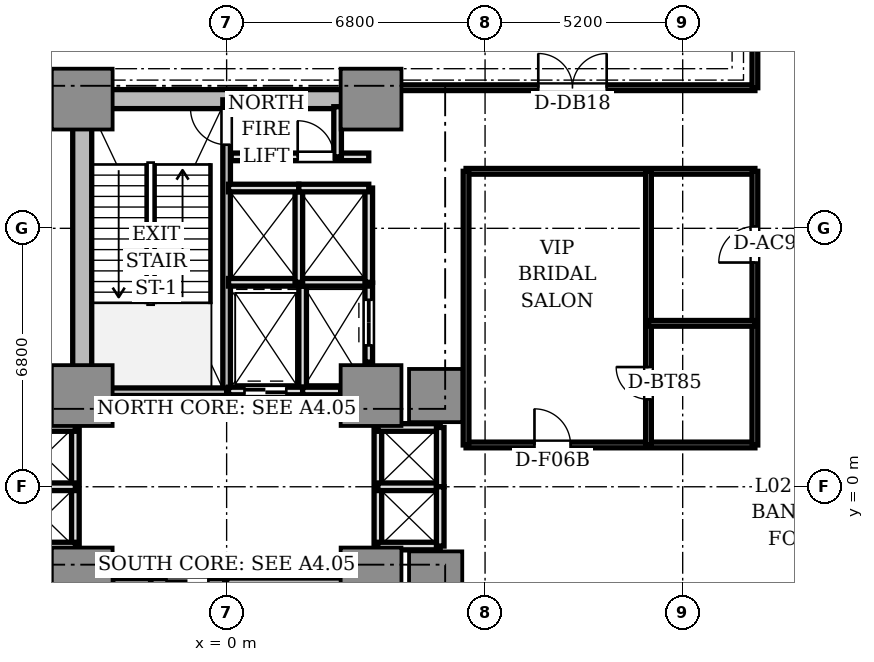
"""IFC4 building model, lengths in metres.
Left out: names, types, materials, properties, quantities, classifications, styles, units other than length and angle.
Written with IfcOpenShell. Run it as: python <this file> out.ifc"""

import sys

from ifc_helpers import new_model, si_unit, direction, frame, frame_2d, origin, origin_2d, place, context, subcontext, project, spatial, rectangle, extrude, source, transform, mapped, element, fill, save


model = new_model("IFC4")
c1 = context("Model", 3, precision=1e-05, world=origin(), true_north=direction((0.0, 1.0)))
c2 = subcontext(c1, "Body", "Model", "MODEL_VIEW")
j1 = project(units=[si_unit("LENGTHUNIT", "METRE"), si_unit("PLANEANGLEUNIT", "RADIAN")], contexts=[c1])
p1 = place(None, origin())
s1 = spatial("IfcSite", under=j1, at=p1, CompositionType="ELEMENT")
p2 = place(p1, origin())
s2 = spatial("IfcBuilding", under=s1, at=p2, CompositionType="ELEMENT")
p3 = place(p2, frame((0.0, 0.0, 9.3)))
s3 = spatial("IfcBuildingStorey", under=s2, at=p3, CompositionType="ELEMENT", Elevation=9.3)
p4 = place(p3, frame((-3.55, 10.2, 0.0), z_axis=(0.0, 0.0, 1.0), x_axis=(1.0, 0.0, 0.0)))
e1 = element("IfcWall", 1, at=p4, inside=s3, PredefinedType="SHEAR", context=c2, shape_type="SweptSolid", body=[
    extrude(rectangle(XDim=7.1, YDim=0.5, at=frame_2d((3.55, 0.0))), origin(), (0.0, 0.0, 1.0), 4.4),
])
p5 = place(p3, frame((-3.8, 2.85, 0.0), z_axis=(0.0, 0.0, 1.0), x_axis=(0.0, 1.0, 0.0)))
e2 = element("IfcWall", 2, at=p5, inside=s3, PredefinedType="SHEAR", context=c2, shape_type="SweptSolid", body=[
    extrude(rectangle(XDim=6.9, YDim=0.5, at=frame_2d((3.45, 0.0))), origin(), (0.0, 0.0, 1.0), 4.4),
])
m1 = source(origin(), c2, "Body", "SweptSolid", [
    extrude(rectangle(XDim=1.6, YDim=1.6, at=origin_2d()), origin(), (0.0, 0.0, 1.0), 4.4),
])
for number, where, z_axis, x_axis in (
    (3, (-3.8, 2.4, 0.0), (0.0, 0.0, 1.0), (1.0, 0.0, 0.0)),
    (4, (3.8, 2.4, 0.0), (0.0, 0.0, 1.0), (1.0, 0.0, 0.0)),
    (5, (-3.8, 10.2, 0.0), (0.0, 0.0, 1.0), (1.0, 0.0, 0.0)),
    (6, (3.8, 10.2, 0.0), (0.0, 0.0, 1.0), (1.0, 0.0, 0.0)),
    (7, (-3.8, -2.4, 0.0), (0.0, 0.0, 1.0), (1.0, 0.0, 0.0)),
    (8, (3.8, -2.4, 0.0), (0.0, 0.0, 1.0), (1.0, 0.0, 0.0)),
):
    element("IfcColumn", number, at=place(p3, frame(where, z_axis=z_axis, x_axis=x_axis)), inside=s3, PredefinedType="COLUMN", context=c2, shape_type="MappedRepresentation", body=[
        mapped(m1, transform((0.0, 0.0, 0.0), scale=1.0)),
    ])
m2 = source(origin(), c2, "Body", "SweptSolid", [
    extrude(rectangle(XDim=1.4, YDim=1.4, at=origin_2d()), origin(), (0.0, 0.0, 1.0), 4.4),
])
for number, where, z_axis, x_axis in (
    (9, (5.5, 2.4, 0.0), (0.0, 0.0, 1.0), (1.0, 0.0, 0.0)),
    (10, (5.5, -2.4, 0.0), (0.0, 0.0, 1.0), (1.0, 0.0, 0.0)),
):
    element("IfcColumn", number, at=place(p3, frame(where, z_axis=z_axis, x_axis=x_axis)), inside=s3, PredefinedType="COLUMN", context=c2, shape_type="MappedRepresentation", body=[
        mapped(m2, transform((0.0, 0.0, 0.0), scale=1.0)),
    ])
p6 = place(p3, frame((0.0, 2.5, 0.0), z_axis=(0.0, 0.0, 1.0), x_axis=(0.0, 1.0, 0.0)))
e11 = element("IfcWall", 11, at=p6, inside=s3, PredefinedType="SOLIDWALL", context=c2, shape_type="SweptSolid", body=[
    extrude(rectangle(XDim=7.68, YDim=0.2, at=frame_2d((3.84, 0.0))), origin(), (0.0, 0.0, 1.0), 4.4),
])
p7 = place(p6, frame((6.5, 0.0, 0.0)))
e12 = element("IfcOpeningElement", 12, at=p7, cuts=e11, PredefinedType="OPENING", context=c2, shape_type="SweptSolid", body=[
    extrude(rectangle(XDim=0.95, YDim=2.15, at=frame_2d((0.475, 1.075))), frame((0.0, 0.11, 0.0), z_axis=(0.0, -1.0, 0.0), x_axis=(1.0, 0.0, 0.0)), (0.0, 0.0, 1.0), 0.22),
])
p8 = place(p3, frame((-3.72, 2.5, 0.0), z_axis=(0.0, 0.0, 1.0), x_axis=(1.0, 0.0, 0.0)))
e13 = element("IfcWall", 13, at=p8, inside=s3, PredefinedType="SOLIDWALL", context=c2, shape_type="SweptSolid", body=[
    extrude(rectangle(XDim=3.72, YDim=0.2, at=frame_2d((1.86, 0.0))), origin(), (0.0, 0.0, 1.0), 4.4),
])
p9 = place(p3, frame((0.0, -10.18, 0.0), z_axis=(0.0, 0.0, 1.0), x_axis=(0.0, 1.0, 0.0)))
e14 = element("IfcWall", 14, at=p9, inside=s3, PredefinedType="SOLIDWALL", context=c2, shape_type="SweptSolid", body=[
    extrude(rectangle(XDim=7.68, YDim=0.2, at=frame_2d((3.84, 0.0))), origin(), (0.0, 0.0, 1.0), 4.4),
])
p10 = place(p9, frame((0.28, 0.0, 0.0)))
e15 = element("IfcOpeningElement", 15, at=p10, cuts=e14, PredefinedType="OPENING", context=c2, shape_type="SweptSolid", body=[
    extrude(rectangle(XDim=1.1, YDim=2.15, at=frame_2d((0.55, 1.075))), frame((0.0, 0.11, 0.0), z_axis=(0.0, -1.0, 0.0), x_axis=(1.0, 0.0, 0.0)), (0.0, 0.0, 1.0), 0.22),
])
p11 = place(p3, frame((0.0, -2.5, 0.0), z_axis=(0.0, 0.0, 1.0), x_axis=(1.0, 0.0, 0.0)))
e16 = element("IfcWall", 16, at=p11, inside=s3, PredefinedType="SOLIDWALL", context=c2, shape_type="SweptSolid", body=[
    extrude(rectangle(XDim=3.72, YDim=0.2, at=frame_2d((1.86, 0.0))), origin(), (0.0, 0.0, 1.0), 4.4),
])
p12 = place(p3, frame((2.0, 2.5, 0.0), z_axis=(0.0, 0.0, 1.0), x_axis=(0.0, 1.0, 0.0)))
e17 = element("IfcWall", 17, at=p12, inside=s3, PredefinedType="SOLIDWALL", context=c2, shape_type="SweptSolid", body=[
    extrude(rectangle(XDim=2.78, YDim=0.2, at=frame_2d((1.39, 0.0))), origin(), (0.0, 0.0, 1.0), 3.95),
])
p13 = place(p3, frame((0.05, 2.52, 0.0), z_axis=(0.0, 0.0, 1.0), x_axis=(1.0, 0.0, 0.0)))
e18 = element("IfcWall", 18, at=p13, inside=s3, PredefinedType="SOLIDWALL", context=c2, shape_type="SweptSolid", body=[
    extrude(rectangle(XDim=1.95, YDim=0.2, at=frame_2d((0.975, 0.0))), origin(), (0.0, 0.0, 1.0), 3.95),
])
p14 = place(p13, frame((0.42, 0.0, 0.0)))
e19 = element("IfcOpeningElement", 19, at=p14, cuts=e18, PredefinedType="OPENING", context=c2, shape_type="SweptSolid", body=[
    extrude(rectangle(XDim=1.1, YDim=2.2, at=frame_2d((0.55, 1.1))), frame((0.0, 0.11, 0.0), z_axis=(0.0, -1.0, 0.0), x_axis=(1.0, 0.0, 0.0)), (0.0, 0.0, 1.0), 0.22),
])
p15 = place(p3, frame((-2.0, -5.28, 0.0), z_axis=(0.0, 0.0, 1.0), x_axis=(0.0, 1.0, 0.0)))
e20 = element("IfcWall", 20, at=p15, inside=s3, PredefinedType="SOLIDWALL", context=c2, shape_type="SweptSolid", body=[
    extrude(rectangle(XDim=2.78, YDim=0.2, at=frame_2d((1.39, 0.0))), origin(), (0.0, 0.0, 1.0), 3.95),
])
p16 = place(p3, frame((-2.0, -2.52, 0.0), z_axis=(0.0, 0.0, 1.0), x_axis=(1.0, 0.0, 0.0)))
e21 = element("IfcWall", 21, at=p16, inside=s3, PredefinedType="SOLIDWALL", context=c2, shape_type="SweptSolid", body=[
    extrude(rectangle(XDim=1.95, YDim=0.2, at=frame_2d((0.975, 0.0))), origin(), (0.0, 0.0, 1.0), 3.95),
])
p17 = place(p16, frame((0.42, 0.0, 0.0)))
e22 = element("IfcOpeningElement", 22, at=p17, cuts=e21, PredefinedType="OPENING", context=c2, shape_type="SweptSolid", body=[
    extrude(rectangle(XDim=1.1, YDim=2.2, at=frame_2d((0.55, 1.1))), frame((0.0, 0.11, 0.0), z_axis=(0.0, -1.0, 0.0), x_axis=(1.0, 0.0, 0.0)), (0.0, 0.0, 1.0), 0.22),
])
p18 = place(p3, frame((2.0, 2.52, 0.0), z_axis=(0.0, 0.0, 1.0), x_axis=(1.0, 0.0, 0.0)))
e23 = element("IfcWall", 23, at=p18, inside=s3, PredefinedType="SOLIDWALL", context=c2, shape_type="SweptSolid", body=[
    extrude(rectangle(XDim=1.0, YDim=0.2, at=frame_2d((0.5, 0.0))), origin(), (0.0, 0.0, 1.0), 3.95),
])
p19 = place(p3, frame((3.74, 3.28, 0.0), z_axis=(0.0, 0.0, 1.0), x_axis=(0.0, 1.0, 0.0)))
e24 = element("IfcWall", 24, at=p19, inside=s3, PredefinedType="SOLIDWALL", context=c2, shape_type="SweptSolid", body=[
    extrude(rectangle(XDim=2.08, YDim=0.2, at=frame_2d((1.04, 0.0))), origin(), (0.0, 0.0, 1.0), 3.95),
])
p20 = place(p19, frame((0.44, 0.0, 0.0)))
e25 = element("IfcOpeningElement", 25, at=p20, cuts=e24, PredefinedType="OPENING", context=c2, shape_type="SweptSolid", body=[
    extrude(rectangle(XDim=1.2, YDim=2.2, at=frame_2d((0.6, 1.1))), frame((0.0, 0.11, 0.0), z_axis=(0.0, -1.0, 0.0), x_axis=(1.0, 0.0, 0.0)), (0.0, 0.0, 1.0), 0.22),
])
p21 = place(p3, frame((-3.0, -2.52, 0.0), z_axis=(0.0, 0.0, 1.0), x_axis=(1.0, 0.0, 0.0)))
e26 = element("IfcWall", 26, at=p21, inside=s3, PredefinedType="SOLIDWALL", context=c2, shape_type="SweptSolid", body=[
    extrude(rectangle(XDim=1.0, YDim=0.2, at=frame_2d((0.5, 0.0))), origin(), (0.0, 0.0, 1.0), 3.95),
])
p22 = place(p3, frame((0.05, 5.38, 0.0), z_axis=(0.0, 0.0, 1.0), x_axis=(1.0, 0.0, 0.0)))
e27 = element("IfcWall", 27, at=p22, inside=s3, PredefinedType="SOLIDWALL", context=c2, shape_type="SweptSolid", body=[
    extrude(rectangle(XDim=3.69, YDim=0.2, at=frame_2d((1.845, 0.0))), origin(), (0.0, 0.0, 1.0), 3.95),
])
p23 = place(p3, frame((1.9, 5.38, 0.0), z_axis=(0.0, 0.0, 1.0), x_axis=(0.0, 1.0, 0.0)))
e28 = element("IfcWall", 28, at=p23, inside=s3, PredefinedType="SOLIDWALL", context=c2, shape_type="SweptSolid", body=[
    extrude(rectangle(XDim=2.48, YDim=0.2, at=frame_2d((1.24, 0.0))), origin(), (0.0, 0.0, 1.0), 3.95),
])
p24 = place(p3, frame((0.05, 7.86, 0.0), z_axis=(0.0, 0.0, 1.0), x_axis=(1.0, 0.0, 0.0)))
e29 = element("IfcWall", 29, at=p24, inside=s3, PredefinedType="SOLIDWALL", context=c2, shape_type="SweptSolid", body=[
    extrude(rectangle(XDim=1.85, YDim=0.2, at=frame_2d((0.925, 0.0))), origin(), (0.0, 0.0, 1.0), 3.95),
])
p25 = place(p3, frame((3.74, 5.38, 0.0), z_axis=(0.0, 0.0, 1.0), x_axis=(0.0, 1.0, 0.0)))
e30 = element("IfcWall", 30, at=p25, inside=s3, PredefinedType="SOLIDWALL", context=c2, shape_type="SweptSolid", body=[
    extrude(rectangle(XDim=2.48, YDim=0.2, at=frame_2d((1.24, 0.0))), origin(), (0.0, 0.0, 1.0), 3.95),
])
p26 = place(p3, frame((1.9, 7.86, 0.0), z_axis=(0.0, 0.0, 1.0), x_axis=(1.0, 0.0, 0.0)))
e31 = element("IfcWall", 31, at=p26, inside=s3, PredefinedType="SOLIDWALL", context=c2, shape_type="SweptSolid", body=[
    extrude(rectangle(XDim=1.84, YDim=0.2, at=frame_2d((0.92, 0.0))), origin(), (0.0, 0.0, 1.0), 3.95),
])
p27 = place(p3, frame((3.98, -1.56, 0.0), z_axis=(0.0, 0.0, 1.0), x_axis=(0.0, 1.0, 0.0)))
e32 = element("IfcWall", 32, at=p27, inside=s3, PredefinedType="SOLIDWALL", context=c2, shape_type="SweptSolid", body=[
    extrude(rectangle(XDim=3.12, YDim=0.2, at=frame_2d((1.56, 0.0))), origin(), (0.0, 0.0, 1.0), 3.47),
])
for number, where, z_axis, x_axis in (
    (33, (3.98, 1.56, 0.0), (0.0, 0.0, 1.0), (1.0, 0.0, 0.0)),
    (34, (3.98, -1.56, 0.0), (0.0, 0.0, 1.0), (1.0, 0.0, 0.0)),
    (35, (3.98, 0.0, 0.0), (0.0, 0.0, 1.0), (1.0, 0.0, 0.0)),
):
    element("IfcWall", number, at=place(p3, frame(where, z_axis=z_axis, x_axis=x_axis)), inside=s3, PredefinedType="SOLIDWALL", context=c2, shape_type="SweptSolid", body=[
        extrude(rectangle(XDim=1.64, YDim=0.2, at=frame_2d((0.82, 0.0))), origin(), (0.0, 0.0, 1.0), 3.95),
    ])
for number, where, z_axis, x_axis in (
    (36, (5.62, 0.0, 0.0), (0.0, 0.0, 1.0), (0.0, 1.0, 0.0)),
    (37, (5.62, -1.56, 0.0), (0.0, 0.0, 1.0), (0.0, 1.0, 0.0)),
):
    element("IfcWall", number, at=place(p3, frame(where, z_axis=z_axis, x_axis=x_axis)), inside=s3, PredefinedType="SOLIDWALL", context=c2, shape_type="SweptSolid", body=[
        extrude(rectangle(XDim=1.56, YDim=0.2, at=frame_2d((0.78, 0.0))), origin(), (0.0, 0.0, 1.0), 3.95),
    ])
p28 = place(p3, frame((-3.98, -1.56, 0.0), z_axis=(0.0, 0.0, 1.0), x_axis=(0.0, 1.0, 0.0)))
e38 = element("IfcWall", 38, at=p28, inside=s3, PredefinedType="SOLIDWALL", context=c2, shape_type="SweptSolid", body=[
    extrude(rectangle(XDim=3.12, YDim=0.2, at=frame_2d((1.56, 0.0))), origin(), (0.0, 0.0, 1.0), 3.47),
])
for number, where, z_axis, x_axis in (
    (39, (-5.62, 1.56, 0.0), (0.0, 0.0, 1.0), (1.0, 0.0, 0.0)),
    (40, (-5.62, -1.56, 0.0), (0.0, 0.0, 1.0), (1.0, 0.0, 0.0)),
    (41, (-5.62, 0.0, 0.0), (0.0, 0.0, 1.0), (1.0, 0.0, 0.0)),
):
    element("IfcWall", number, at=place(p3, frame(where, z_axis=z_axis, x_axis=x_axis)), inside=s3, PredefinedType="SOLIDWALL", context=c2, shape_type="SweptSolid", body=[
        extrude(rectangle(XDim=1.64, YDim=0.2, at=frame_2d((0.82, 0.0))), origin(), (0.0, 0.0, 1.0), 3.95),
    ])
p29 = place(p3, frame((0.12, 8.68, 0.0), z_axis=(0.0, 0.0, 1.0), x_axis=(1.0, 0.0, 0.0)))
e42 = element("IfcWall", 42, at=p29, inside=s3, PredefinedType="SOLIDWALL", context=c2, shape_type="SweptSolid", body=[
    extrude(rectangle(XDim=3.62, YDim=0.2, at=frame_2d((1.81, 0.0))), origin(), (0.0, 0.0, 1.0), 3.95),
])
p30 = place(p29, frame((1.75, 0.0, 0.0)))
e43 = element("IfcOpeningElement", 43, at=p30, cuts=e42, PredefinedType="OPENING", context=c2, shape_type="SweptSolid", body=[
    extrude(rectangle(XDim=0.95, YDim=2.15, at=frame_2d((0.475, 1.075))), frame((0.0, 0.11, 0.0), z_axis=(0.0, -1.0, 0.0), x_axis=(1.0, 0.0, 0.0)), (0.0, 0.0, 1.0), 0.22),
])
p31 = place(p3, frame((2.92, 8.68, 0.0), z_axis=(0.0, 0.0, 1.0), x_axis=(0.0, 1.0, 0.0)))
e44 = element("IfcWall", 44, at=p31, inside=s3, PredefinedType="SOLIDWALL", context=c2, shape_type="SweptSolid", body=[
    extrude(rectangle(XDim=1.32, YDim=0.2, at=frame_2d((0.66, 0.0))), origin(), (0.0, 0.0, 1.0), 3.95),
])
p32 = place(p3, frame((-13.9, 10.5, 0.0), z_axis=(0.0, 0.0, 1.0), x_axis=(1.0, 0.0, 0.0)))
e45 = element("IfcWall", 45, at=p32, inside=s3, PredefinedType="PARTITIONING", context=c2, shape_type="SweptSolid", body=[
    extrude(rectangle(XDim=9.5, YDim=0.15, at=frame_2d((4.75, 0.0))), origin(), (0.0, 0.0, 1.0), 3.95),
])
p33 = place(p32, frame((3.8, 0.0, 0.0)))
e46 = element("IfcOpeningElement", 46, at=p33, cuts=e45, PredefinedType="OPENING", context=c2, shape_type="SweptSolid", body=[
    extrude(rectangle(XDim=1.8, YDim=2.35, at=frame_2d((0.9, 1.175))), frame((0.0, 0.085, 0.0), z_axis=(0.0, -1.0, 0.0), x_axis=(1.0, 0.0, 0.0)), (0.0, 0.0, 1.0), 0.17),
])
p34 = place(p3, frame((4.4, 10.5, 0.0), z_axis=(0.0, 0.0, 1.0), x_axis=(1.0, 0.0, 0.0)))
e47 = element("IfcWall", 47, at=p34, inside=s3, PredefinedType="PARTITIONING", context=c2, shape_type="SweptSolid", body=[
    extrude(rectangle(XDim=9.5, YDim=0.15, at=frame_2d((4.75, 0.0))), origin(), (0.0, 0.0, 1.0), 3.95),
])
p35 = place(p34, frame((3.8, 0.0, 0.0)))
e48 = element("IfcOpeningElement", 48, at=p35, cuts=e47, PredefinedType="OPENING", context=c2, shape_type="SweptSolid", body=[
    extrude(rectangle(XDim=1.8, YDim=2.35, at=frame_2d((0.9, 1.175))), frame((0.0, 0.085, 0.0), z_axis=(0.0, -1.0, 0.0), x_axis=(1.0, 0.0, 0.0)), (0.0, 0.0, 1.0), 0.17),
])
p36 = place(p3, frame((13.9, 10.5, 0.0), z_axis=(0.0, 0.0, 1.0), x_axis=(0.0, 1.0, 0.0)))
e49 = element("IfcWall", 49, at=p36, inside=s3, PredefinedType="PARTITIONING", context=c2, shape_type="SweptSolid", body=[
    extrude(rectangle(XDim=11.2, YDim=0.15, at=frame_2d((5.6, 0.0))), origin(), (0.0, 0.0, 1.0), 3.95),
])
p37 = place(p3, frame((6.3, 1.1, 0.0), z_axis=(0.0, 0.0, 1.0), x_axis=(1.0, 0.0, 0.0)))
e50 = element("IfcWall", 50, at=p37, inside=s3, PredefinedType="PARTITIONING", context=c2, shape_type="SweptSolid", body=[
    extrude(rectangle(XDim=7.6, YDim=0.15, at=frame_2d((3.8, 0.0))), origin(), (0.0, 0.0, 1.0), 3.95),
])
p38 = place(p37, frame((1.8, 0.0, 0.0)))
e51 = element("IfcOpeningElement", 51, at=p38, cuts=e50, PredefinedType="OPENING", context=c2, shape_type="SweptSolid", body=[
    extrude(rectangle(XDim=0.95, YDim=2.15, at=frame_2d((0.475, 1.075))), frame((0.0, 0.085, 0.0), z_axis=(0.0, -1.0, 0.0), x_axis=(1.0, 0.0, 0.0)), (0.0, 0.0, 1.0), 0.17),
])
p39 = place(p3, frame((6.3, 8.3, 0.0), z_axis=(0.0, 0.0, 1.0), x_axis=(1.0, 0.0, 0.0)))
e52 = element("IfcWall", 52, at=p39, inside=s3, PredefinedType="PARTITIONING", context=c2, shape_type="SweptSolid", body=[
    extrude(rectangle(XDim=7.6, YDim=0.15, at=frame_2d((3.8, 0.0))), origin(), (0.0, 0.0, 1.0), 3.95),
])
p40 = place(p3, frame((6.3, 1.1, 0.0), z_axis=(0.0, 0.0, 1.0), x_axis=(0.0, 1.0, 0.0)))
e53 = element("IfcWall", 53, at=p40, inside=s3, PredefinedType="PARTITIONING", context=c2, shape_type="SweptSolid", body=[
    extrude(rectangle(XDim=7.2, YDim=0.15, at=frame_2d((3.6, 0.0))), origin(), (0.0, 0.0, 1.0), 3.95),
])
p41 = place(p3, frame((13.9, 1.1, 0.0), z_axis=(0.0, 0.0, 1.0), x_axis=(0.0, 1.0, 0.0)))
e54 = element("IfcWall", 54, at=p41, inside=s3, PredefinedType="PARTITIONING", context=c2, shape_type="SweptSolid", body=[
    extrude(rectangle(XDim=7.2, YDim=0.15, at=frame_2d((3.6, 0.0))), origin(), (0.0, 0.0, 1.0), 3.95),
])
p42 = place(p41, frame((4.8, 0.0, 0.0)))
e55 = element("IfcOpeningElement", 55, at=p42, cuts=e54, PredefinedType="OPENING", context=c2, shape_type="SweptSolid", body=[
    extrude(rectangle(XDim=0.95, YDim=2.15, at=frame_2d((0.475, 1.075))), frame((0.0, 0.085, 0.0), z_axis=(0.0, -1.0, 0.0), x_axis=(1.0, 0.0, 0.0)), (0.0, 0.0, 1.0), 0.17),
])
p43 = place(p3, frame((11.1, 1.1, 0.0), z_axis=(0.0, 0.0, 1.0), x_axis=(0.0, 1.0, 0.0)))
e56 = element("IfcWall", 56, at=p43, inside=s3, PredefinedType="PARTITIONING", context=c2, shape_type="SweptSolid", body=[
    extrude(rectangle(XDim=7.2, YDim=0.15, at=frame_2d((3.6, 0.0))), origin(), (0.0, 0.0, 1.0), 3.95),
])
p44 = place(p43, frame((1.2, 0.0, 0.0)))
e57 = element("IfcOpeningElement", 57, at=p44, cuts=e56, PredefinedType="OPENING", context=c2, shape_type="SweptSolid", body=[
    extrude(rectangle(XDim=0.85, YDim=2.1, at=frame_2d((0.425, 1.05))), frame((0.0, 0.085, 0.0), z_axis=(0.0, -1.0, 0.0), x_axis=(1.0, 0.0, 0.0)), (0.0, 0.0, 1.0), 0.17),
])
p45 = place(p3, frame((11.1, 4.3, 0.0), z_axis=(0.0, 0.0, 1.0), x_axis=(1.0, 0.0, 0.0)))
e58 = element("IfcWall", 58, at=p45, inside=s3, PredefinedType="PARTITIONING", context=c2, shape_type="SweptSolid", body=[
    extrude(rectangle(XDim=2.8, YDim=0.15, at=frame_2d((1.4, 0.0))), origin(), (0.0, 0.0, 1.0), 2.87),
])
m3 = source(origin(), c2, "Body", "SweptSolid", [
    extrude(rectangle(XDim=1.1, YDim=0.05, at=origin_2d()), origin(), (0.0, 0.0, 1.0), 2.2),
])
p46 = place(p14, frame((0.55, 0.0, 0.0)))
e59 = element("IfcDoor", 59, at=p46, inside=s3, OperationType="DOUBLE_DOOR_SLIDING", PredefinedType="DOOR", context=c2, shape_type="MappedRepresentation", body=[
    mapped(m3, transform((0.0, 0.0, 0.0), scale=1.0)),
])
fill(e19, e59)
p47 = place(p17, frame((0.55, 0.0, 0.0)))
e60 = element("IfcDoor", 60, at=p47, inside=s3, OperationType="DOUBLE_DOOR_SLIDING", PredefinedType="DOOR", context=c2, shape_type="MappedRepresentation", body=[
    mapped(m3, transform((0.0, 0.0, 0.0), scale=1.0)),
])
fill(e22, e60)
m4 = source(origin(), c2, "Body", "SweptSolid", [
    extrude(rectangle(XDim=1.2, YDim=0.05, at=origin_2d()), origin(), (0.0, 0.0, 1.0), 2.2),
])
p48 = place(p20, frame((0.6, 0.0, 0.0)))
e61 = element("IfcDoor", 61, at=p48, inside=s3, OperationType="DOUBLE_DOOR_SLIDING", PredefinedType="DOOR", context=c2, shape_type="MappedRepresentation", body=[
    mapped(m4, transform((0.0, 0.0, 0.0), scale=1.0)),
])
fill(e25, e61)
m5 = source(origin(), c2, "Body", "SweptSolid", [
    extrude(rectangle(XDim=0.95, YDim=0.05, at=origin_2d()), origin(), (0.0, 0.0, 1.0), 2.15),
])
p49 = place(p7, frame((0.475, 0.0, 0.0)))
e62 = element("IfcDoor", 62, at=p49, inside=s3, OperationType="SINGLE_SWING_RIGHT", PredefinedType="DOOR", context=c2, shape_type="MappedRepresentation", body=[
    mapped(m5, transform((0.0, 0.0, 0.0), scale=1.0)),
])
fill(e12, e62)
p50 = place(p30, frame((0.475, 0.0, 0.0)))
e63 = element("IfcDoor", 63, at=p50, inside=s3, OperationType="SINGLE_SWING_LEFT", PredefinedType="DOOR", context=c2, shape_type="MappedRepresentation", body=[
    mapped(m5, transform((0.0, 0.0, 0.0), scale=1.0)),
])
fill(e43, e63)
m6 = source(origin(), c2, "Body", "SweptSolid", [
    extrude(rectangle(XDim=1.8, YDim=0.05, at=origin_2d()), origin(), (0.0, 0.0, 1.0), 2.35),
])
p51 = place(p35, frame((0.9, 0.0, 0.0)))
e64 = element("IfcDoor", 64, at=p51, inside=s3, OperationType="DOUBLE_DOOR_SINGLE_SWING", PredefinedType="DOOR", context=c2, shape_type="MappedRepresentation", body=[
    mapped(m6, transform((0.0, 0.0, 0.0), scale=1.0)),
])
fill(e48, e64)
p52 = place(p38, frame((0.475, 0.0, 0.0)))
e65 = element("IfcDoor", 65, at=p52, inside=s3, OperationType="SINGLE_SWING_LEFT", PredefinedType="DOOR", context=c2, shape_type="MappedRepresentation", body=[
    mapped(m5, transform((0.0, 0.0, 0.0), scale=1.0)),
])
fill(e51, e65)
m7 = source(origin(), c2, "Body", "SweptSolid", [
    extrude(rectangle(XDim=0.85, YDim=0.05, at=origin_2d()), origin(), (0.0, 0.0, 1.0), 2.1),
])
p53 = place(p44, frame((0.425, 0.0, 0.0)))
e66 = element("IfcDoor", 66, at=p53, inside=s3, OperationType="SINGLE_SWING_RIGHT", PredefinedType="DOOR", context=c2, shape_type="MappedRepresentation", body=[
    mapped(m7, transform((0.0, 0.0, 0.0), scale=1.0)),
])
fill(e57, e66)
p54 = place(p42, frame((0.475, 0.0, 0.0)))
e67 = element("IfcDoor", 67, at=p54, inside=s3, OperationType="SINGLE_SWING_LEFT", PredefinedType="DOOR", context=c2, shape_type="MappedRepresentation", body=[
    mapped(m5, transform((0.0, 0.0, 0.0), scale=1.0)),
])
fill(e55, e67)
save(model, sys.argv[1])
